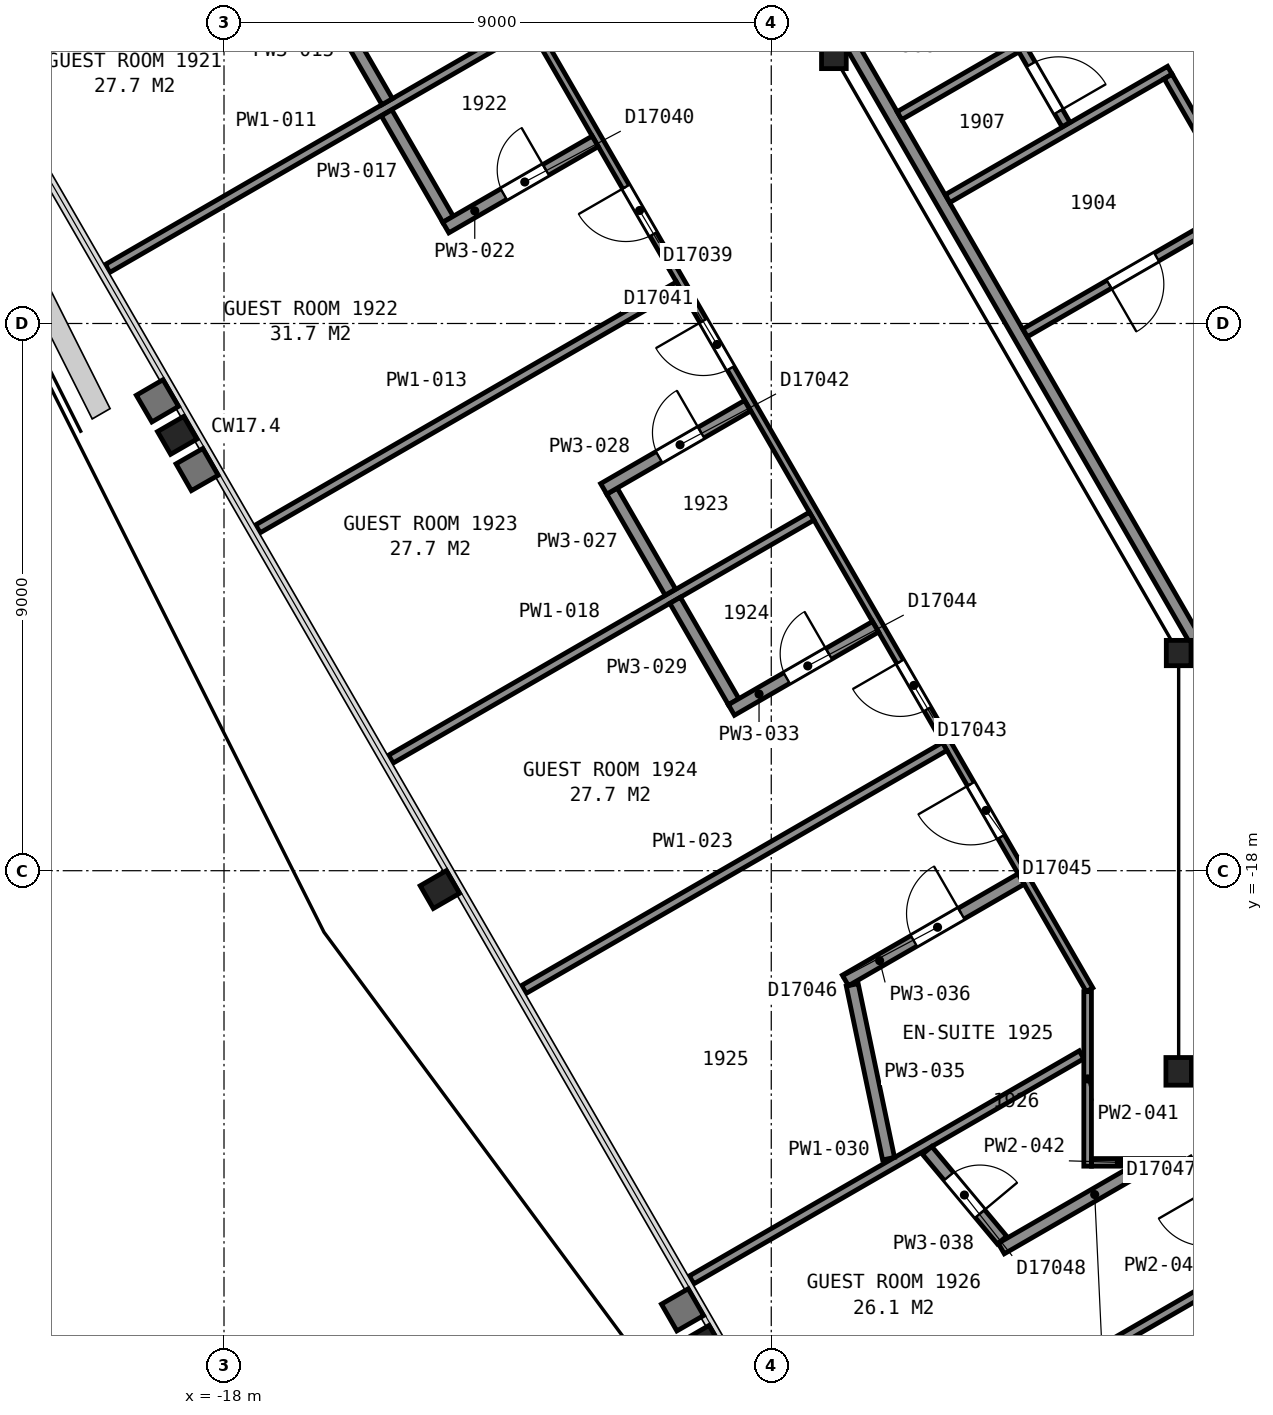
"""IFC4 building model, lengths in metres.
Left out: names, types, materials, properties, quantities, classifications, styles, units other than length and angle.
Written with IfcOpenShell. Run it as: python <this file> out.ifc"""

import sys

from ifc_helpers import new_model, si_unit, direction, frame, frame_2d, origin, origin_2d, place, context, subcontext, project, spatial, rectangle, i_section, extrude, element, fill, save


model = new_model("IFC4")
c1 = context("Model", 3, precision=1e-05, world=origin(), true_north=direction((0.0, 1.0)))
c2 = subcontext(c1, "Body", "Model", "MODEL_VIEW")
j1 = project(units=[si_unit("LENGTHUNIT", "METRE"), si_unit("PLANEANGLEUNIT", "RADIAN")], contexts=[c1])
p1 = place(None, origin())
s1 = spatial("IfcSite", under=j1, at=p1, CompositionType="ELEMENT")
p2 = place(p1, origin())
s2 = spatial("IfcBuilding", under=s1, at=p2, CompositionType="ELEMENT")
p3 = place(p2, frame((0.0, 0.0, 83.6)))
s3 = spatial("IfcBuildingStorey", under=s2, at=p3, CompositionType="ELEMENT", Elevation=83.6)
for number, where, z_axis, x_axis in (
    (1, (-18.77, -10.84, 0.0), (0.0, 0.0, 1.0), (-0.5, 0.866, 0.0)),
    (2, (-14.45, -18.31, 0.0), (0.0, 0.0, 1.0), (-0.5, 0.866, 0.0)),
    (3, (-10.13, -25.79, 0.0), (0.0, 0.0, 1.0), (-0.5, 0.866, 0.0)),
):
    element("IfcColumn", number, at=place(p3, frame(where, z_axis=z_axis, x_axis=x_axis)), inside=s3, PredefinedType="COLUMN", context=c2, shape_type="SweptSolid", body=[
        extrude(i_section(OverallWidth=0.432, OverallDepth=0.498, WebThickness=0.056, FlangeThickness=0.089, FilletRadius=0.015, at=origin_2d()), origin(), (0.0, 0.0, 1.0), 2.87),
    ])
for number, where, z_axis, x_axis in (
    (4, (-7.97, -4.6, 0.0), (0.0, 0.0, 1.0), (1.0, 0.0, 0.0)),
    (5, (-2.3, -14.42, 0.0), (0.0, 0.0, 1.0), (1.0, 0.0, 0.0)),
):
    element("IfcColumn", number, at=place(p3, frame(where, z_axis=z_axis, x_axis=x_axis)), inside=s3, PredefinedType="COLUMN", context=c2, shape_type="SweptSolid", body=[
        extrude(i_section(OverallWidth=0.406, OverallDepth=0.417, WebThickness=0.03, FlangeThickness=0.048, FilletRadius=0.015, at=origin_2d()), origin(), (0.0, 0.0, 1.0), 3.6),
    ])
p4 = place(p3, frame((-2.3, -21.3, 0.0), z_axis=(0.0, 0.0, 1.0), x_axis=(-1.0, 0.0, 0.0)))
e6 = element("IfcColumn", 6, at=p4, inside=s3, PredefinedType="COLUMN", context=c2, shape_type="SweptSolid", body=[
    extrude(i_section(OverallWidth=0.419, OverallDepth=0.455, WebThickness=0.042, FlangeThickness=0.068, FilletRadius=0.015, at=origin_2d()), origin(), (0.0, 0.0, 1.0), 3.6),
])
p5 = place(p3, frame((-13.664, 5.946, 0.0), z_axis=(0.0, 0.0, 1.0), x_axis=(0.499994327219, -0.866028678941, 0.0)))
e7 = element("IfcWall", 7, at=p5, inside=s3, PredefinedType="PARTITIONING", context=c2, shape_type="SweptSolid", body=[
    extrude(rectangle(XDim=23.968, YDim=0.2, at=frame_2d((11.984, 0.0))), origin(), (0.0, 0.0, 1.0), 3.35),
])
p6 = place(p3, frame((-6.892, -5.582, 0.0), z_axis=(0.0, 0.0, 1.0), x_axis=(0.865944298464, 0.500140452231, 0.0)))
e8 = element("IfcWall", 8, at=p6, inside=s3, PredefinedType="PARTITIONING", context=c2, shape_type="SweptSolid", body=[
    extrude(rectangle(XDim=2.224, YDim=0.15, at=frame_2d((1.112, 0.0))), origin(), (0.0, 0.0, 1.0), 3.35),
])
p7 = place(p3, frame((-6.1, -6.946, 0.0), z_axis=(0.0, 0.0, 1.0), x_axis=(0.866038200431, 0.499977834903, 0.0)))
e9 = element("IfcWall", 9, at=p7, inside=s3, PredefinedType="PARTITIONING", context=c2, shape_type="SweptSolid", body=[
    extrude(rectangle(XDim=4.22, YDim=0.15, at=frame_2d((2.11, 0.0))), origin(), (0.0, 0.0, 1.0), 3.35),
])
p8 = place(p3, frame((-4.152, -5.729, 0.0), z_axis=(0.0, 0.0, 1.0), x_axis=(-0.500024287448, 0.866011380966, 0.0)))
e10 = element("IfcWall", 10, at=p8, inside=s3, PredefinedType="PARTITIONING", context=c2, shape_type="SweptSolid", body=[
    extrude(rectangle(XDim=3.501, YDim=0.15, at=frame_2d((1.75, 0.0))), origin(), (0.0, 0.0, 1.0), 3.35),
])
p9 = place(p8, frame((2.026, 0.0, 0.0)))
e11 = element("IfcOpeningElement", 11, at=p9, cuts=e10, PredefinedType="OPENING", context=c2, shape_type="SweptSolid", body=[
    extrude(rectangle(XDim=0.9, YDim=2.1, at=frame_2d((0.45, 1.05))), frame((0.0, 0.085, 0.0), z_axis=(0.0, -1.0, 0.0), x_axis=(1.0, 0.0, 0.0)), (0.0, 0.0, 1.0), 0.17),
])
p10 = place(p8, frame((0.248, 0.0, 0.0)))
e12 = element("IfcOpeningElement", 12, at=p10, cuts=e10, PredefinedType="OPENING", context=c2, shape_type="SweptSolid", body=[
    extrude(rectangle(XDim=0.9, YDim=2.1, at=frame_2d((0.45, 1.05))), frame((0.0, 0.085, 0.0), z_axis=(0.0, -1.0, 0.0), x_axis=(1.0, 0.0, 0.0)), (0.0, 0.0, 1.0), 0.17),
])
p11 = place(p3, frame((-4.825, -9.154, 0.0), z_axis=(0.0, 0.0, 1.0), x_axis=(0.866023738697, 0.500002884005, 0.0)))
e13 = element("IfcWall", 13, at=p11, inside=s3, PredefinedType="PARTITIONING", context=c2, shape_type="SweptSolid", body=[
    extrude(rectangle(XDim=4.22, YDim=0.15, at=frame_2d((2.11, 0.0))), origin(), (0.0, 0.0, 1.0), 3.35),
])
p12 = place(p11, frame((1.595, 0.0, 0.0)))
e14 = element("IfcOpeningElement", 14, at=p12, cuts=e13, PredefinedType="OPENING", context=c2, shape_type="SweptSolid", body=[
    extrude(rectangle(XDim=0.9, YDim=2.1, at=frame_2d((0.45, 1.05))), frame((0.0, 0.085, 0.0), z_axis=(0.0, -1.0, 0.0), x_axis=(1.0, 0.0, 0.0)), (0.0, 0.0, 1.0), 0.17),
])
p13 = place(p3, frame((-2.472, -4.938, 0.0), z_axis=(0.0, 0.0, 1.0), x_axis=(0.500045362686, -0.865999212041, 0.0)))
e15 = element("IfcWall", 15, at=p13, inside=s3, PredefinedType="PARTITIONING", context=c2, shape_type="SweptSolid", body=[
    extrude(rectangle(XDim=2.4, YDim=0.15, at=frame_2d((1.2, 0.0))), origin(), (0.0, 0.0, 1.0), 3.35),
])
p14 = place(p3, frame((-19.916, -8.095, 0.0), z_axis=(0.0, 0.0, 1.0), x_axis=(0.865953574939, 0.500124390578, 0.0)))
e16 = element("IfcWall", 16, at=p14, inside=s3, PredefinedType="PARTITIONING", context=c2, shape_type="SweptSolid", body=[
    extrude(rectangle(XDim=7.992, YDim=0.15, at=frame_2d((3.996, 0.0))), origin(), (0.0, 0.0, 1.0), 2.262),
])
p15 = place(p3, frame((-3.766, -19.958, 0.0), z_axis=(0.0, 0.0, 1.0), x_axis=(-0.50002170027, 0.866012874765, 0.0)))
e17 = element("IfcWall", 17, at=p15, inside=s3, PredefinedType="PARTITIONING", context=c2, shape_type="SweptSolid", body=[
    extrude(rectangle(XDim=31.379, YDim=0.125, at=frame_2d((15.69, 0.0))), origin(), (0.0, 0.0, 1.0), 2.262),
])
p16 = place(p15, frame((25.28, 0.0, 0.0)))
e18 = element("IfcOpeningElement", 18, at=p16, cuts=e17, PredefinedType="OPENING", context=c2, shape_type="SweptSolid", body=[
    extrude(rectangle(XDim=1.5, YDim=2.1, at=frame_2d((0.75, 1.05))), frame((0.0, 0.073, 0.0), z_axis=(0.0, -1.0, 0.0), x_axis=(1.0, 0.0, 0.0)), (0.0, 0.0, 1.0), 0.145),
])
p17 = place(p15, frame((21.124, 0.0, 0.0)))
e19 = element("IfcOpeningElement", 19, at=p17, cuts=e17, PredefinedType="OPENING", context=c2, shape_type="SweptSolid", body=[
    extrude(rectangle(XDim=0.9, YDim=2.1, at=frame_2d((0.45, 1.05))), frame((0.0, 0.073, 0.0), z_axis=(0.0, -1.0, 0.0), x_axis=(1.0, 0.0, 0.0)), (0.0, 0.0, 1.0), 0.145),
])
p18 = place(p15, frame((14.349, 0.0, 0.0)))
e20 = element("IfcOpeningElement", 20, at=p18, cuts=e17, PredefinedType="OPENING", context=c2, shape_type="SweptSolid", body=[
    extrude(rectangle(XDim=0.9, YDim=2.1, at=frame_2d((0.45, 1.05))), frame((0.0, 0.073, 0.0), z_axis=(0.0, -1.0, 0.0), x_axis=(1.0, 0.0, 0.0)), (0.0, 0.0, 1.0), 0.145),
])
p19 = place(p15, frame((11.804, 0.0, 0.0)))
e21 = element("IfcOpeningElement", 21, at=p19, cuts=e17, PredefinedType="OPENING", context=c2, shape_type="SweptSolid", body=[
    extrude(rectangle(XDim=0.9, YDim=2.1, at=frame_2d((0.45, 1.05))), frame((0.0, 0.073, 0.0), z_axis=(0.0, -1.0, 0.0), x_axis=(1.0, 0.0, 0.0)), (0.0, 0.0, 1.0), 0.145),
])
p20 = place(p15, frame((5.33, 0.0, 0.0)))
e22 = element("IfcOpeningElement", 22, at=p20, cuts=e17, PredefinedType="OPENING", context=c2, shape_type="SweptSolid", body=[
    extrude(rectangle(XDim=0.9, YDim=2.1, at=frame_2d((0.45, 1.05))), frame((0.0, 0.073, 0.0), z_axis=(0.0, -1.0, 0.0), x_axis=(1.0, 0.0, 0.0)), (0.0, 0.0, 1.0), 0.145),
])
p21 = place(p15, frame((2.906, 0.0, 0.0)))
e23 = element("IfcOpeningElement", 23, at=p21, cuts=e17, PredefinedType="OPENING", context=c2, shape_type="SweptSolid", body=[
    extrude(rectangle(XDim=1.0, YDim=2.1, at=frame_2d((0.5, 1.05))), frame((0.0, 0.073, 0.0), z_axis=(0.0, -1.0, 0.0), x_axis=(1.0, 0.0, 0.0)), (0.0, 0.0, 1.0), 0.145),
])
p22 = place(p3, frame((-17.443, -12.377, 0.0), z_axis=(0.0, 0.0, 1.0), x_axis=(0.866021771655, 0.500006290979, 0.0)))
e24 = element("IfcWall", 24, at=p22, inside=s3, PredefinedType="PARTITIONING", context=c2, shape_type="SweptSolid", body=[
    extrude(rectangle(XDim=7.992, YDim=0.15, at=frame_2d((3.996, 0.0))), origin(), (0.0, 0.0, 1.0), 2.262),
])
p23 = place(p3, frame((-16.279, -3.686, 0.0), z_axis=(0.0, 0.0, 1.0), x_axis=(0.500190942922, -0.865915134767, 0.0)))
e25 = element("IfcWall", 25, at=p23, inside=s3, PredefinedType="PARTITIONING", context=c2, shape_type="SweptSolid", body=[
    extrude(rectangle(XDim=1.925, YDim=0.2, at=frame_2d((0.962, 0.0))), origin(), (0.0, 0.0, 1.0), 2.262),
])
p24 = place(p3, frame((-15.326, -5.536, 0.0), z_axis=(0.0, 0.0, 1.0), x_axis=(0.499868889286, -0.866101087359, 0.0)))
e26 = element("IfcWall", 26, at=p24, inside=s3, PredefinedType="PARTITIONING", context=c2, shape_type="SweptSolid", body=[
    extrude(rectangle(XDim=2.021, YDim=0.2, at=frame_2d((1.01, 0.0))), origin(), (0.0, 0.0, 1.0), 2.262),
])
p25 = place(p3, frame((-15.256, -16.165, 0.0), z_axis=(0.0, 0.0, 1.0), x_axis=(0.866008543052, 0.500029202507, 0.0)))
e27 = element("IfcWall", 27, at=p25, inside=s3, PredefinedType="PARTITIONING", context=c2, shape_type="SweptSolid", body=[
    extrude(rectangle(XDim=7.992, YDim=0.15, at=frame_2d((3.996, 0.0))), origin(), (0.0, 0.0, 1.0), 2.262),
])
p26 = place(p3, frame((-14.353, -7.423, 0.0), z_axis=(0.0, 0.0, 1.0), x_axis=(0.866010792954, 0.500025305846, 0.0)))
e28 = element("IfcWall", 28, at=p26, inside=s3, PredefinedType="PARTITIONING", context=c2, shape_type="SweptSolid", body=[
    extrude(rectangle(XDim=2.838, YDim=0.2, at=frame_2d((1.419, 0.0))), origin(), (0.0, 0.0, 1.0), 2.262),
])
p27 = place(p26, frame((1.1, 0.0, 0.0)))
e29 = element("IfcOpeningElement", 29, at=p27, cuts=e28, PredefinedType="OPENING", context=c2, shape_type="SweptSolid", body=[
    extrude(rectangle(XDim=0.8, YDim=2.1, at=frame_2d((0.4, 1.05))), frame((0.0, 0.11, 0.0), z_axis=(0.0, -1.0, 0.0), x_axis=(1.0, 0.0, 0.0)), (0.0, 0.0, 1.0), 0.22),
])
p28 = place(p3, frame((-13.069, -19.953, 0.0), z_axis=(0.0, 0.0, 1.0), x_axis=(0.866021771655, 0.500006290979, 0.0)))
e30 = element("IfcWall", 30, at=p28, inside=s3, PredefinedType="PARTITIONING", context=c2, shape_type="SweptSolid", body=[
    extrude(rectangle(XDim=7.992, YDim=0.15, at=frame_2d((3.996, 0.0))), origin(), (0.0, 0.0, 1.0), 2.262),
])
p29 = place(p3, frame((-11.619, -11.757, 0.0), z_axis=(0.0, 0.0, 1.0), x_axis=(0.500133489192, -0.865948320045, 0.0)))
e31 = element("IfcWall", 31, at=p29, inside=s3, PredefinedType="PARTITIONING", context=c2, shape_type="SweptSolid", body=[
    extrude(rectangle(XDim=1.919, YDim=0.2, at=frame_2d((0.96, 0.0))), origin(), (0.0, 0.0, 1.0), 2.262),
])
p30 = place(p3, frame((-9.389, -10.353, 0.0), z_axis=(0.0, 0.0, 1.0), x_axis=(-0.865858193421, -0.500289505072, 0.0)))
e32 = element("IfcWall", 32, at=p30, inside=s3, PredefinedType="PARTITIONING", context=c2, shape_type="SweptSolid", body=[
    extrude(rectangle(XDim=2.733, YDim=0.2, at=frame_2d((1.366, 0.0))), origin(), (0.0, 0.0, 1.0), 2.262),
])
p31 = place(p30, frame((0.883, 0.0, 0.0)))
e33 = element("IfcOpeningElement", 33, at=p31, cuts=e32, PredefinedType="OPENING", context=c2, shape_type="SweptSolid", body=[
    extrude(rectangle(XDim=0.8, YDim=2.1, at=frame_2d((0.4, 1.05))), frame((0.0, 0.11, 0.0), z_axis=(0.0, -1.0, 0.0), x_axis=(1.0, 0.0, 0.0)), (0.0, 0.0, 1.0), 0.22),
])
p32 = place(p3, frame((-10.582, -13.553, 0.0), z_axis=(0.0, 0.0, 1.0), x_axis=(0.499971247393, -0.866042003473, 0.0)))
e34 = element("IfcWall", 34, at=p32, inside=s3, PredefinedType="PARTITIONING", context=c2, shape_type="SweptSolid", body=[
    extrude(rectangle(XDim=1.925, YDim=0.2, at=frame_2d((0.963, 0.0))), origin(), (0.0, 0.0, 1.0), 2.262),
])
p33 = place(p3, frame((-10.311, -24.73, 0.0), z_axis=(0.0, 0.0, 1.0), x_axis=(0.8660132178, 0.500021106151, 0.0)))
e35 = element("IfcWall", 35, at=p33, inside=s3, PredefinedType="PARTITIONING", context=c2, shape_type="SweptSolid", body=[
    extrude(rectangle(XDim=7.406, YDim=0.15, at=frame_2d((3.703, 0.0))), origin(), (0.0, 0.0, 1.0), 2.262),
])
p34 = place(p3, frame((-9.656, -15.357, 0.0), z_axis=(0.0, 0.0, 1.0), x_axis=(0.866005850709, 0.50003386539, 0.0)))
e36 = element("IfcWall", 36, at=p34, inside=s3, PredefinedType="PARTITIONING", context=c2, shape_type="SweptSolid", body=[
    extrude(rectangle(XDim=2.737, YDim=0.2, at=frame_2d((1.369, 0.0))), origin(), (0.0, 0.0, 1.0), 2.262),
])
p35 = place(p34, frame((1.05, 0.0, 0.0)))
e37 = element("IfcOpeningElement", 37, at=p35, cuts=e36, PredefinedType="OPENING", context=c2, shape_type="SweptSolid", body=[
    extrude(rectangle(XDim=0.8, YDim=2.1, at=frame_2d((0.4, 1.05))), frame((0.0, 0.11, 0.0), z_axis=(0.0, -1.0, 0.0), x_axis=(1.0, 0.0, 0.0)), (0.0, 0.0, 1.0), 0.22),
])
p36 = place(p3, frame((-8.124, -28.518, 0.0), z_axis=(0.0, 0.0, 1.0), x_axis=(0.866021771655, 0.500006290979, 0.0)))
e38 = element("IfcWall", 38, at=p36, inside=s3, PredefinedType="PARTITIONING", context=c2, shape_type="SweptSolid", body=[
    extrude(rectangle(XDim=7.992, YDim=0.15, at=frame_2d((3.996, 0.0))), origin(), (0.0, 0.0, 1.0), 2.262),
])
p37 = place(p3, frame((-7.668, -19.877, 0.0), z_axis=(0.0, 0.0, 1.0), x_axis=(0.204611748063, -0.978843211426, 0.0)))
e39 = element("IfcWall", 39, at=p37, inside=s3, PredefinedType="PARTITIONING", context=c2, shape_type="SweptSolid", body=[
    extrude(rectangle(XDim=2.921, YDim=0.2, at=frame_2d((1.46, 0.0))), origin(), (0.0, 0.0, 1.0), 2.262),
])
p38 = place(p3, frame((-4.89, -18.136, 0.0), z_axis=(0.0, 0.0, 1.0), x_axis=(-0.866033317326, -0.499986293093, 0.0)))
e40 = element("IfcWall", 40, at=p38, inside=s3, PredefinedType="PARTITIONING", context=c2, shape_type="SweptSolid", body=[
    extrude(rectangle(XDim=3.337, YDim=0.2, at=frame_2d((1.669, 0.0))), origin(), (0.0, 0.0, 1.0), 2.262),
])
p39 = place(p38, frame((1.138, 0.0, 0.0)))
e41 = element("IfcOpeningElement", 41, at=p39, cuts=e40, PredefinedType="OPENING", context=c2, shape_type="SweptSolid", body=[
    extrude(rectangle(XDim=0.9, YDim=2.1, at=frame_2d((0.45, 1.05))), frame((0.0, 0.11, 0.0), z_axis=(0.0, -1.0, 0.0), x_axis=(1.0, 0.0, 0.0)), (0.0, 0.0, 1.0), 0.22),
])
p40 = place(p3, frame((-6.437, -22.6, 0.0), z_axis=(0.0, 0.0, 1.0), x_axis=(0.640970893908, -0.76756518496, 0.0)))
e42 = element("IfcWall", 42, at=p40, inside=s3, PredefinedType="PARTITIONING", context=c2, shape_type="SweptSolid", body=[
    extrude(rectangle(XDim=1.923, YDim=0.2, at=frame_2d((0.961, 0.0))), origin(), (0.0, 0.0, 1.0), 2.262),
])
p41 = place(p40, frame((0.556, 0.0, 0.0)))
e43 = element("IfcOpeningElement", 43, at=p41, cuts=e42, PredefinedType="OPENING", context=c2, shape_type="SweptSolid", body=[
    extrude(rectangle(XDim=0.8, YDim=2.1, at=frame_2d((0.4, 1.05))), frame((0.0, 0.11, 0.0), z_axis=(0.0, -1.0, 0.0), x_axis=(1.0, 0.0, 0.0)), (0.0, 0.0, 1.0), 0.22),
])
p42 = place(p3, frame((-5.218, -24.214, 0.0), z_axis=(0.0, 0.0, 1.0), x_axis=(0.865922540442, 0.500178122226, 0.0)))
e44 = element("IfcWall", 44, at=p42, inside=s3, PredefinedType="PARTITIONING", context=c2, shape_type="SweptSolid", body=[
    extrude(rectangle(XDim=2.535, YDim=0.2, at=frame_2d((1.268, 0.0))), origin(), (0.0, 0.0, 1.0), 2.262),
])
p43 = place(p3, frame((-3.797, -22.86, 0.0), z_axis=(0.0, 0.0, 1.0), x_axis=(0.0, 1.0, 0.0)))
e45 = element("IfcWall", 45, at=p43, inside=s3, PredefinedType="PARTITIONING", context=c2, shape_type="SweptSolid", body=[
    extrude(rectangle(XDim=2.871, YDim=0.125, at=frame_2d((1.435, 0.0))), origin(), (0.0, 0.0, 1.0), 2.262),
])
p44 = place(p3, frame((-3.732, -22.797, 0.0), z_axis=(0.0, 0.0, 1.0), x_axis=(1.0, 0.0, 0.0)))
e46 = element("IfcWall", 46, at=p44, inside=s3, PredefinedType="PARTITIONING", context=c2, shape_type="SweptSolid", body=[
    extrude(rectangle(XDim=1.52, YDim=0.125, at=frame_2d((0.76, 0.0))), origin(), (0.0, 0.0, 1.0), 2.262),
])
p45 = place(p3, frame((-0.877, -24.962, 0.0), z_axis=(0.0, 0.0, 1.0), x_axis=(-0.500063308241, 0.865988849669, 0.0)))
e47 = element("IfcWall", 47, at=p45, inside=s3, PredefinedType="PARTITIONING", context=c2, shape_type="SweptSolid", body=[
    extrude(rectangle(XDim=2.563, YDim=0.125, at=frame_2d((1.281, 0.0))), origin(), (0.0, 0.0, 1.0), 2.262),
])
p46 = place(p45, frame((1.05, 0.0, 0.0)))
e48 = element("IfcOpeningElement", 48, at=p46, cuts=e47, PredefinedType="OPENING", context=c2, shape_type="SweptSolid", body=[
    extrude(rectangle(XDim=0.9, YDim=2.1, at=frame_2d((0.45, 1.05))), frame((0.0, 0.073, 0.0), z_axis=(0.0, -1.0, 0.0), x_axis=(1.0, 0.0, 0.0)), (0.0, 0.0, 1.0), 0.145),
])
p47 = place(p10, origin())
e49 = element("IfcDoor", 49, at=p47, inside=s3, OperationType="SINGLE_SWING_LEFT", PredefinedType="DOOR", context=c2, shape_type="SweptSolid", body=[
    extrude(rectangle(XDim=0.9, YDim=2.1, at=frame_2d((0.45, 1.05))), frame((0.0, 0.025, 0.0), z_axis=(0.0, -1.0, 0.0), x_axis=(1.0, 0.0, 0.0)), (0.0, 0.0, 1.0), 0.05),
])
fill(e12, e49)
p48 = place(p12, origin())
e50 = element("IfcDoor", 50, at=p48, inside=s3, OperationType="SINGLE_SWING_LEFT", PredefinedType="DOOR", context=c2, shape_type="SweptSolid", body=[
    extrude(rectangle(XDim=0.9, YDim=2.1, at=frame_2d((0.45, 1.05))), frame((0.0, 0.025, 0.0), z_axis=(0.0, -1.0, 0.0), x_axis=(1.0, 0.0, 0.0)), (0.0, 0.0, 1.0), 0.05),
])
fill(e14, e50)
p49 = place(p18, origin())
e51 = element("IfcDoor", 51, at=p49, inside=s3, OperationType="SINGLE_SWING_RIGHT", PredefinedType="DOOR", context=c2, shape_type="SweptSolid", body=[
    extrude(rectangle(XDim=0.9, YDim=2.1, at=frame_2d((0.45, 1.05))), frame((0.0, 0.025, 0.0), z_axis=(0.0, -1.0, 0.0), x_axis=(1.0, 0.0, 0.0)), (0.0, 0.0, 1.0), 0.05),
])
fill(e20, e51)
p50 = place(p19, origin())
e52 = element("IfcDoor", 52, at=p50, inside=s3, OperationType="SINGLE_SWING_RIGHT", PredefinedType="DOOR", context=c2, shape_type="SweptSolid", body=[
    extrude(rectangle(XDim=0.9, YDim=2.1, at=frame_2d((0.45, 1.05))), frame((0.0, 0.025, 0.0), z_axis=(0.0, -1.0, 0.0), x_axis=(1.0, 0.0, 0.0)), (0.0, 0.0, 1.0), 0.05),
])
fill(e21, e52)
p51 = place(p20, origin())
e53 = element("IfcDoor", 53, at=p51, inside=s3, OperationType="SINGLE_SWING_RIGHT", PredefinedType="DOOR", context=c2, shape_type="SweptSolid", body=[
    extrude(rectangle(XDim=0.9, YDim=2.1, at=frame_2d((0.45, 1.05))), frame((0.0, 0.025, 0.0), z_axis=(0.0, -1.0, 0.0), x_axis=(1.0, 0.0, 0.0)), (0.0, 0.0, 1.0), 0.05),
])
fill(e22, e53)
p52 = place(p21, origin())
e54 = element("IfcDoor", 54, at=p52, inside=s3, OperationType="SINGLE_SWING_RIGHT", PredefinedType="DOOR", context=c2, shape_type="SweptSolid", body=[
    extrude(rectangle(XDim=1.0, YDim=2.1, at=frame_2d((0.5, 1.05))), frame((0.0, 0.025, 0.0), z_axis=(0.0, -1.0, 0.0), x_axis=(1.0, 0.0, 0.0)), (0.0, 0.0, 1.0), 0.05),
])
fill(e23, e54)
p53 = place(p27, origin())
e55 = element("IfcDoor", 55, at=p53, inside=s3, OperationType="SINGLE_SWING_RIGHT", PredefinedType="DOOR", context=c2, shape_type="SweptSolid", body=[
    extrude(rectangle(XDim=0.8, YDim=2.1, at=frame_2d((0.4, 1.05))), frame((0.0, 0.025, 0.0), z_axis=(0.0, -1.0, 0.0), x_axis=(1.0, 0.0, 0.0)), (0.0, 0.0, 1.0), 0.05),
])
fill(e29, e55)
p54 = place(p31, origin())
e56 = element("IfcDoor", 56, at=p54, inside=s3, OperationType="SINGLE_SWING_LEFT", PredefinedType="DOOR", context=c2, shape_type="SweptSolid", body=[
    extrude(rectangle(XDim=0.8, YDim=2.1, at=frame_2d((0.4, 1.05))), frame((0.0, 0.025, 0.0), z_axis=(0.0, -1.0, 0.0), x_axis=(1.0, 0.0, 0.0)), (0.0, 0.0, 1.0), 0.05),
])
fill(e33, e56)
p55 = place(p35, origin())
e57 = element("IfcDoor", 57, at=p55, inside=s3, OperationType="SINGLE_SWING_RIGHT", PredefinedType="DOOR", context=c2, shape_type="SweptSolid", body=[
    extrude(rectangle(XDim=0.8, YDim=2.1, at=frame_2d((0.4, 1.05))), frame((0.0, 0.025, 0.0), z_axis=(0.0, -1.0, 0.0), x_axis=(1.0, 0.0, 0.0)), (0.0, 0.0, 1.0), 0.05),
])
fill(e37, e57)
p56 = place(p39, origin())
e58 = element("IfcDoor", 58, at=p56, inside=s3, OperationType="SINGLE_SWING_LEFT", PredefinedType="DOOR", context=c2, shape_type="SweptSolid", body=[
    extrude(rectangle(XDim=0.9, YDim=2.1, at=frame_2d((0.45, 1.05))), frame((0.0, 0.025, 0.0), z_axis=(0.0, -1.0, 0.0), x_axis=(1.0, 0.0, 0.0)), (0.0, 0.0, 1.0), 0.05),
])
fill(e41, e58)
p57 = place(p41, origin())
e59 = element("IfcDoor", 59, at=p57, inside=s3, OperationType="SINGLE_SWING_RIGHT", PredefinedType="DOOR", context=c2, shape_type="SweptSolid", body=[
    extrude(rectangle(XDim=0.8, YDim=2.1, at=frame_2d((0.4, 1.05))), frame((0.0, 0.025, 0.0), z_axis=(0.0, -1.0, 0.0), x_axis=(1.0, 0.0, 0.0)), (0.0, 0.0, 1.0), 0.05),
])
fill(e43, e59)
save(model, sys.argv[1])
